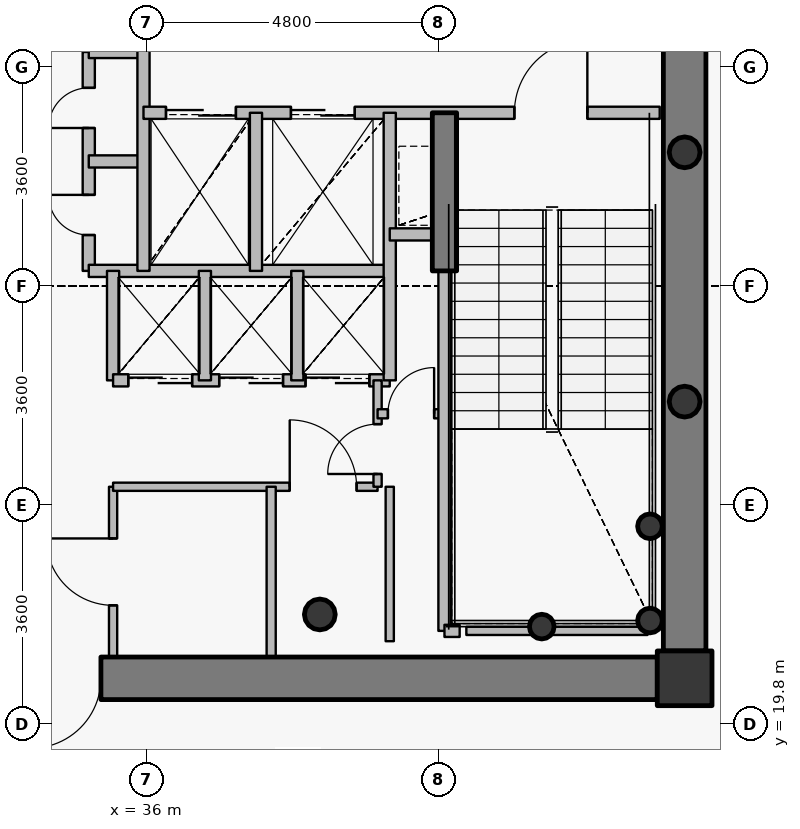
"""IFC4 building model, lengths in metres.
Left out: names, types, materials, properties, quantities, classifications, styles, units other than length and angle.
Written with IfcOpenShell. Run it as: python <this file> out.ifc"""

import sys

from ifc_helpers import new_model, si_unit, direction, frame, frame_2d, origin, origin_2d, place, context, subcontext, project, spatial, rectangle, hollow_circle, extrude, source, transform, mapped, element, fill, save


model = new_model("IFC4")
c1 = context("Model", 3, precision=1e-05, world=origin(), true_north=direction((0.0, 1.0)))
c2 = subcontext(c1, "Body", "Model", "MODEL_VIEW")
j1 = project(units=[si_unit("LENGTHUNIT", "METRE"), si_unit("PLANEANGLEUNIT", "RADIAN")], contexts=[c1])
p1 = place(None, origin())
s1 = spatial("IfcSite", under=j1, at=p1, CompositionType="ELEMENT")
p2 = place(p1, origin())
s2 = spatial("IfcBuilding", under=s1, at=p2, CompositionType="ELEMENT")
p3 = place(p2, frame((0.0, 0.0, 324.0)))
s3 = spatial("IfcBuildingStorey", under=s2, at=p3, CompositionType="ELEMENT", Elevation=324.0)
p4 = place(p3, frame((44.85, 20.55, 0.0), z_axis=(0.0, 0.0, 1.0), x_axis=(1.0, 0.0, 0.0)))
e1 = element("IfcColumn", 1, at=p4, inside=s3, PredefinedType="COLUMN", context=c2, shape_type="SweptSolid", body=[
    extrude(rectangle(XDim=0.9, YDim=0.9, at=origin_2d()), origin(), (0.0, 0.0, 1.0), 3.8),
])
p5 = place(p3, frame((38.85, 21.6, 0.0), z_axis=(0.0, 0.0, 1.0), x_axis=(1.0, 0.0, 0.0)))
e2 = element("IfcColumn", 2, at=p5, inside=s3, PredefinedType="COLUMN", context=c2, shape_type="SweptSolid", body=[
    extrude(hollow_circle(Radius=0.254, WallThickness=0.02, at=origin_2d()), origin(), (0.0, 0.0, 1.0), 3.8),
])
for number, where, z_axis, x_axis in (
    (3, (44.28, 21.5, 0.0), (0.0, 0.0, 1.0), (1.0, 0.0, 0.0)),
    (4, (44.28, 23.05, 0.0), (0.0, 0.0, 1.0), (1.0, 0.0, 0.0)),
    (5, (42.5, 21.4, 0.0), (0.0, 0.0, 1.0), (1.0, 0.0, 0.0)),
):
    element("IfcColumn", number, at=place(p3, frame(where, z_axis=z_axis, x_axis=x_axis)), inside=s3, PredefinedType="COLUMN", context=c2, shape_type="SweptSolid", body=[
        extrude(hollow_circle(Radius=0.203, WallThickness=0.016, at=origin_2d()), origin(), (0.0, 0.0, 1.0), 3.8),
    ])
p6 = place(p3, frame((44.85, 33.0, 0.0), z_axis=(0.0, 0.0, 1.0), x_axis=(0.0, -1.0, 0.0)))
e6 = element("IfcWall", 6, at=p6, inside=s3, PredefinedType="SHEAR", context=c2, shape_type="SweptSolid", body=[
    extrude(rectangle(XDim=12.0, YDim=0.7, at=frame_2d((6.0, 0.0))), origin(), (0.0, 0.0, 1.0), 3.1),
])
p7 = place(p3, frame((44.4, 20.55, 0.0), z_axis=(0.0, 0.0, 1.0), x_axis=(-1.0, 0.0, 0.0)))
e7 = element("IfcWall", 7, at=p7, inside=s3, PredefinedType="SHEAR", context=c2, shape_type="SweptSolid", body=[
    extrude(rectangle(XDim=16.8, YDim=0.7, at=frame_2d((8.4, 0.0))), origin(), (0.0, 0.0, 1.0), 3.1),
])
p8 = place(p7, frame((13.0, 0.0, 0.0)))
e8 = element("IfcOpeningElement", 8, at=p8, cuts=e7, PredefinedType="OPENING", context=c2, shape_type="SweptSolid", body=[
    extrude(rectangle(XDim=1.15, YDim=2.15, at=origin_2d()), frame((0.575, 0.36, 1.075), z_axis=(0.0, -1.0, 0.0), x_axis=(1.0, 0.0, 0.0)), (0.0, 0.0, 1.0), 0.72),
])
p9 = place(p7, frame((9.15, 0.0, 0.0)))
e9 = element("IfcOpeningElement", 9, at=p9, cuts=e7, PredefinedType="OPENING", context=c2, shape_type="SweptSolid", body=[
    extrude(rectangle(XDim=1.15, YDim=2.15, at=origin_2d()), frame((0.575, 0.36, 1.075), z_axis=(0.0, -1.0, 0.0), x_axis=(1.0, 0.0, 0.0)), (0.0, 0.0, 1.0), 0.72),
])
p10 = place(p3, frame((40.9, 27.25, 0.0), z_axis=(0.0, 0.0, 1.0), x_axis=(0.0, 1.0, 0.0)))
e10 = element("IfcWall", 10, at=p10, inside=s3, PredefinedType="SHEAR", context=c2, shape_type="SweptSolid", body=[
    extrude(rectangle(XDim=2.6, YDim=0.4, at=frame_2d((1.3, 0.0))), origin(), (0.0, 0.0, 1.0), 3.15),
])
for number, where, z_axis, x_axis in (
    (11, (44.85, 25.1, 0.0), (0.0, 0.0, 1.0), (1.0, 0.0, 0.0)),
    (12, (44.85, 29.2, 0.0), (0.0, 0.0, 1.0), (1.0, 0.0, 0.0)),
):
    element("IfcColumn", number, at=place(p3, frame(where, z_axis=z_axis, x_axis=x_axis)), inside=s3, PredefinedType="COLUMN", context=c2, shape_type="SweptSolid", body=[
        extrude(hollow_circle(Radius=0.254, WallThickness=0.02, at=origin_2d()), origin(), (0.0, 0.0, 1.0), 3.8),
    ])
p11 = place(p3, frame((35.05, 27.25, 0.0), z_axis=(0.0, 0.0, 1.0), x_axis=(0.0, 1.0, 0.0)))
e13 = element("IfcWall", 13, at=p11, inside=s3, PredefinedType="PARTITIONING", context=c2, shape_type="SweptSolid", body=[
    extrude(rectangle(XDim=3.6, YDim=0.2, at=frame_2d((1.8, 0.0))), origin(), (0.0, 0.0, 1.0), 3.55),
])
p12 = place(p11, frame((0.59, 0.0, 0.0)))
e14 = element("IfcOpeningElement", 14, at=p12, cuts=e13, PredefinedType="OPENING", context=c2, shape_type="SweptSolid", body=[
    extrude(rectangle(XDim=0.66, YDim=2.05, at=origin_2d()), frame((0.33, 0.11, 1.025), z_axis=(0.0, -1.0, 0.0), x_axis=(1.0, 0.0, 0.0)), (0.0, 0.0, 1.0), 0.22),
])
p13 = place(p11, frame((2.35, 0.0, 0.0)))
e15 = element("IfcOpeningElement", 15, at=p13, cuts=e13, PredefinedType="OPENING", context=c2, shape_type="SweptSolid", body=[
    extrude(rectangle(XDim=0.66, YDim=2.05, at=origin_2d()), frame((0.33, 0.11, 1.025), z_axis=(0.0, -1.0, 0.0), x_axis=(1.0, 0.0, 0.0)), (0.0, 0.0, 1.0), 0.22),
])
p14 = place(p3, frame((35.05, 27.25, 0.0), z_axis=(0.0, 0.0, 1.0), x_axis=(1.0, 0.0, 0.0)))
e16 = element("IfcWall", 16, at=p14, inside=s3, PredefinedType="PARTITIONING", context=c2, shape_type="SweptSolid", body=[
    extrude(rectangle(XDim=4.95, YDim=0.2, at=frame_2d((2.475, 0.0))), origin(), (0.0, 0.0, 1.0), 3.135),
])
for number, where, z_axis, x_axis in (
    (17, (35.05, 29.05, 0.0), (0.0, 0.0, 1.0), (1.0, 0.0, 0.0)),
    (18, (35.05, 30.85, 0.0), (0.0, 0.0, 1.0), (1.0, 0.0, 0.0)),
):
    element("IfcWall", number, at=place(p3, frame(where, z_axis=z_axis, x_axis=x_axis)), inside=s3, PredefinedType="PARTITIONING", context=c2, shape_type="SweptSolid", body=[
        extrude(rectangle(XDim=0.9, YDim=0.2, at=frame_2d((0.45, 0.0))), origin(), (0.0, 0.0, 1.0), 3.55),
    ])
p15 = place(p3, frame((35.45, 20.9, 0.0), z_axis=(0.0, 0.0, 1.0), x_axis=(0.0, 1.0, 0.0)))
e19 = element("IfcWall", 19, at=p15, inside=s3, PredefinedType="PARTITIONING", context=c2, shape_type="SweptSolid", body=[
    extrude(rectangle(XDim=2.8, YDim=0.135, at=frame_2d((1.4, 0.0))), origin(), (0.0, 0.0, 1.0), 3.135),
])
p16 = place(p15, frame((0.85, 0.0, 0.0)))
e20 = element("IfcOpeningElement", 20, at=p16, cuts=e19, PredefinedType="OPENING", context=c2, shape_type="SweptSolid", body=[
    extrude(rectangle(XDim=1.1, YDim=2.15, at=origin_2d()), frame((0.55, 0.078, 1.075), z_axis=(0.0, -1.0, 0.0), x_axis=(1.0, 0.0, 0.0)), (0.0, 0.0, 1.0), 0.155),
])
p17 = place(p3, frame((35.45, 23.7, 0.0), z_axis=(0.0, 0.0, 1.0), x_axis=(1.0, 0.0, 0.0)))
e21 = element("IfcWall", 21, at=p17, inside=s3, PredefinedType="PARTITIONING", context=c2, shape_type="SweptSolid", body=[
    extrude(rectangle(XDim=4.35, YDim=0.135, at=frame_2d((2.175, 0.0))), origin(), (0.0, 0.0, 1.0), 3.135),
])
p18 = place(p17, frame((2.905, 0.0, 0.0)))
e22 = element("IfcOpeningElement", 22, at=p18, cuts=e21, PredefinedType="OPENING", context=c2, shape_type="SweptSolid", body=[
    extrude(rectangle(XDim=1.1, YDim=2.15, at=origin_2d()), frame((0.55, 0.078, 1.075), z_axis=(0.0, -1.0, 0.0), x_axis=(1.0, 0.0, 0.0)), (0.0, 0.0, 1.0), 0.155),
])
p19 = place(p3, frame((35.45, 25.45, 0.0), z_axis=(0.0, 0.0, 1.0), x_axis=(0.0, 1.0, 0.0)))
e23 = element("IfcWall", 23, at=p19, inside=s3, PredefinedType="PARTITIONING", context=c2, shape_type="SweptSolid", body=[
    extrude(rectangle(XDim=1.8, YDim=0.2, at=frame_2d((0.9, 0.0))), origin(), (0.0, 0.0, 1.0), 3.55),
])
p20 = place(p3, frame((35.45, 25.45, 0.0), z_axis=(0.0, 0.0, 1.0), x_axis=(1.0, 0.0, 0.0)))
e24 = element("IfcWall", 24, at=p20, inside=s3, PredefinedType="PARTITIONING", context=c2, shape_type="SweptSolid", body=[
    extrude(rectangle(XDim=4.55, YDim=0.2, at=frame_2d((2.275, 0.0))), origin(), (0.0, 0.0, 1.0), 3.135),
])
p21 = place(p20, frame((0.25, 0.0, 0.0)))
e25 = element("IfcOpeningElement", 25, at=p21, cuts=e24, PredefinedType="OPENING", context=c2, shape_type="SweptSolid", body=[
    extrude(rectangle(XDim=1.05, YDim=2.15, at=origin_2d()), frame((0.525, 0.11, 1.075), z_axis=(0.0, -1.0, 0.0), x_axis=(1.0, 0.0, 0.0)), (0.0, 0.0, 1.0), 0.22),
])
p22 = place(p20, frame((1.745, 0.0, 0.0)))
e26 = element("IfcOpeningElement", 26, at=p22, cuts=e24, PredefinedType="OPENING", context=c2, shape_type="SweptSolid", body=[
    extrude(rectangle(XDim=1.05, YDim=2.15, at=origin_2d()), frame((0.525, 0.11, 1.075), z_axis=(0.0, -1.0, 0.0), x_axis=(1.0, 0.0, 0.0)), (0.0, 0.0, 1.0), 0.22),
])
p23 = place(p20, frame((3.165, 0.0, 0.0)))
e27 = element("IfcOpeningElement", 27, at=p23, cuts=e24, PredefinedType="OPENING", context=c2, shape_type="SweptSolid", body=[
    extrude(rectangle(XDim=1.05, YDim=2.15, at=origin_2d()), frame((0.525, 0.11, 1.075), z_axis=(0.0, -1.0, 0.0), x_axis=(1.0, 0.0, 0.0)), (0.0, 0.0, 1.0), 0.22),
])
p24 = place(p3, frame((35.95, 27.25, 0.0), z_axis=(0.0, 0.0, 1.0), x_axis=(0.0, 1.0, 0.0)))
e28 = element("IfcWall", 28, at=p24, inside=s3, PredefinedType="PARTITIONING", context=c2, shape_type="SweptSolid", body=[
    extrude(rectangle(XDim=3.8, YDim=0.2, at=frame_2d((1.9, 0.0))), origin(), (0.0, 0.0, 1.0), 3.55),
])
p25 = place(p3, frame((35.95, 29.85, 0.0), z_axis=(0.0, 0.0, 1.0), x_axis=(1.0, 0.0, 0.0)))
e29 = element("IfcWall", 29, at=p25, inside=s3, PredefinedType="PARTITIONING", context=c2, shape_type="SweptSolid", body=[
    extrude(rectangle(XDim=8.49, YDim=0.2, at=frame_2d((4.245, 0.0))), origin(), (0.0, 0.0, 1.0), 3.135),
])
p26 = place(p25, frame((6.1, 0.0, 0.0)))
e30 = element("IfcOpeningElement", 30, at=p26, cuts=e29, PredefinedType="OPENING", context=c2, shape_type="SweptSolid", body=[
    extrude(rectangle(XDim=1.2, YDim=2.15, at=origin_2d()), frame((0.6, 0.11, 1.075), z_axis=(0.0, -1.0, 0.0), x_axis=(1.0, 0.0, 0.0)), (0.0, 0.0, 1.0), 0.22),
])
p27 = place(p25, frame((0.37, 0.0, 0.0)))
e31 = element("IfcOpeningElement", 31, at=p27, cuts=e29, PredefinedType="OPENING", context=c2, shape_type="SweptSolid", body=[
    extrude(rectangle(XDim=1.15, YDim=2.15, at=origin_2d()), frame((0.575, 0.11, 1.075), z_axis=(0.0, -1.0, 0.0), x_axis=(1.0, 0.0, 0.0)), (0.0, 0.0, 1.0), 0.22),
])
p28 = place(p25, frame((2.425, 0.0, 0.0)))
e32 = element("IfcOpeningElement", 32, at=p28, cuts=e29, PredefinedType="OPENING", context=c2, shape_type="SweptSolid", body=[
    extrude(rectangle(XDim=1.05, YDim=2.15, at=origin_2d()), frame((0.525, 0.11, 1.075), z_axis=(0.0, -1.0, 0.0), x_axis=(1.0, 0.0, 0.0)), (0.0, 0.0, 1.0), 0.22),
])
p29 = place(p3, frame((36.96, 25.45, 0.0), z_axis=(0.0, 0.0, 1.0), x_axis=(0.0, 1.0, 0.0)))
e33 = element("IfcWall", 33, at=p29, inside=s3, PredefinedType="PARTITIONING", context=c2, shape_type="SweptSolid", body=[
    extrude(rectangle(XDim=1.8, YDim=0.2, at=frame_2d((0.9, 0.0))), origin(), (0.0, 0.0, 1.0), 3.55),
])
p30 = place(p3, frame((37.8, 27.25, 0.0), z_axis=(0.0, 0.0, 1.0), x_axis=(0.0, 1.0, 0.0)))
e34 = element("IfcWall", 34, at=p30, inside=s3, PredefinedType="PARTITIONING", context=c2, shape_type="SweptSolid", body=[
    extrude(rectangle(XDim=2.6, YDim=0.2, at=frame_2d((1.3, 0.0))), origin(), (0.0, 0.0, 1.0), 3.55),
])
p31 = place(p3, frame((38.05, 20.38, 0.0), z_axis=(0.0, 0.0, 1.0), x_axis=(0.0, 1.0, 0.0)))
e35 = element("IfcWall", 35, at=p31, inside=s3, PredefinedType="PARTITIONING", context=c2, shape_type="SweptSolid", body=[
    extrude(rectangle(XDim=3.32, YDim=0.15, at=frame_2d((1.66, 0.0))), origin(), (0.0, 0.0, 1.0), 3.085),
])
p32 = place(p3, frame((38.48, 25.45, 0.0), z_axis=(0.0, 0.0, 1.0), x_axis=(0.0, 1.0, 0.0)))
e36 = element("IfcWall", 36, at=p32, inside=s3, PredefinedType="PARTITIONING", context=c2, shape_type="SweptSolid", body=[
    extrude(rectangle(XDim=1.8, YDim=0.2, at=frame_2d((0.9, 0.0))), origin(), (0.0, 0.0, 1.0), 3.55),
])
p33 = place(p3, frame((39.8, 23.7, 0.0), z_axis=(0.0, 0.0, 1.0), x_axis=(0.0, 1.0, 0.0)))
e37 = element("IfcWall", 37, at=p33, inside=s3, PredefinedType="PARTITIONING", context=c2, shape_type="SweptSolid", body=[
    extrude(rectangle(XDim=1.75, YDim=0.135, at=frame_2d((0.875, 0.0))), origin(), (0.0, 0.0, 1.0), 3.55),
])
p34 = place(p33, frame((0.21, 0.0, 0.0)))
e38 = element("IfcOpeningElement", 38, at=p34, cuts=e37, PredefinedType="OPENING", context=c2, shape_type="SweptSolid", body=[
    extrude(rectangle(XDim=0.82, YDim=2.1, at=origin_2d()), frame((0.41, 0.078, 1.05), z_axis=(0.0, -1.0, 0.0), x_axis=(1.0, 0.0, 0.0)), (0.0, 0.0, 1.0), 0.155),
])
p35 = place(p3, frame((39.8, 24.9, 0.0), z_axis=(0.0, 0.0, 1.0), x_axis=(1.0, 0.0, 0.0)))
e39 = element("IfcWall", 39, at=p35, inside=s3, PredefinedType="PARTITIONING", context=c2, shape_type="SweptSolid", body=[
    extrude(rectangle(XDim=1.1, YDim=0.15, at=frame_2d((0.55, 0.0))), origin(), (0.0, 0.0, 1.0), 3.55),
])
p36 = place(p35, frame((0.17, 0.0, 0.0)))
e40 = element("IfcOpeningElement", 40, at=p36, cuts=e39, PredefinedType="OPENING", context=c2, shape_type="SweptSolid", body=[
    extrude(rectangle(XDim=0.76, YDim=2.1, at=origin_2d()), frame((0.38, 0.085, 1.05), z_axis=(0.0, -1.0, 0.0), x_axis=(1.0, 0.0, 0.0)), (0.0, 0.0, 1.0), 0.17),
])
p37 = place(p3, frame((40.0, 25.45, 0.0), z_axis=(0.0, 0.0, 1.0), x_axis=(0.0, 1.0, 0.0)))
e41 = element("IfcWall", 41, at=p37, inside=s3, PredefinedType="PARTITIONING", context=c2, shape_type="SweptSolid", body=[
    extrude(rectangle(XDim=4.4, YDim=0.2, at=frame_2d((2.2, 0.0))), origin(), (0.0, 0.0, 1.0), 3.55),
])
p38 = place(p3, frame((40.0, 27.85, 0.0), z_axis=(0.0, 0.0, 1.0), x_axis=(1.0, 0.0, 0.0)))
e42 = element("IfcWall", 42, at=p38, inside=s3, PredefinedType="PARTITIONING", context=c2, shape_type="SweptSolid", body=[
    extrude(rectangle(XDim=0.9, YDim=0.2, at=frame_2d((0.45, 0.0))), origin(), (0.0, 0.0, 1.0), 3.55),
])
p39 = place(p3, frame((40.9, 21.33, 0.0), z_axis=(0.0, 0.0, 1.0), x_axis=(0.0, 1.0, 0.0)))
e43 = element("IfcWall", 43, at=p39, inside=s3, PredefinedType="PARTITIONING", context=c2, shape_type="SweptSolid", body=[
    extrude(rectangle(XDim=5.91, YDim=0.2, at=frame_2d((2.955, 0.0))), origin(), (0.0, 0.0, 1.0), 3.085),
])
p40 = place(p3, frame((40.9, 21.33, 0.0), z_axis=(0.0, 0.0, 1.0), x_axis=(1.0, 0.0, 0.0)))
e44 = element("IfcWall", 44, at=p40, inside=s3, PredefinedType="PARTITIONING", context=c2, shape_type="SweptSolid", body=[
    extrude(rectangle(XDim=0.25, YDim=0.2, at=frame_2d((0.125, 0.0))), origin(), (0.0, 0.0, 1.0), 3.085),
])
p41 = place(p3, frame((44.24, 21.33, 0.0), z_axis=(0.0, 0.0, 1.0), x_axis=(-1.0, 0.0, 0.0)))
e45 = element("IfcWall", 45, at=p41, inside=s3, PredefinedType="PARTITIONING", context=c2, shape_type="SweptSolid", body=[
    extrude(rectangle(XDim=2.98, YDim=0.135, at=frame_2d((1.49, 0.0))), origin(), (0.0, 0.0, 1.0), 3.085),
])
p42 = place(p3, frame((40.0, 23.7, 0.0), z_axis=(0.0, 0.0, 1.0), x_axis=(0.0, -1.0, 0.0)))
e46 = element("IfcWall", 46, at=p42, inside=s3, PredefinedType="PARTITIONING", context=c2, shape_type="SweptSolid", body=[
    extrude(rectangle(XDim=2.54, YDim=0.135, at=frame_2d((1.27, 0.0))), origin(), (0.0, 0.0, 1.0), 3.085),
])
p43 = place(p3, frame((44.41, 20.2, 0.0), z_axis=(0.0, 0.0, 1.0), x_axis=(1.0, 0.0, 0.0)))
e47 = element("IfcWall", 47, at=p43, inside=s3, PredefinedType="PARTITIONING", context=c2, shape_type="SweptSolid", body=[
    extrude(rectangle(XDim=0.79, YDim=0.135, at=frame_2d((0.395, 0.0))), origin(), (0.0, 0.0, 1.0), 3.085),
])
p44 = place(p3, frame((45.2, 20.508, 0.0), z_axis=(0.0, 0.0, 1.0), x_axis=(0.0, 1.0, 0.0)))
e48 = element("IfcWall", 48, at=p44, inside=s3, PredefinedType="PARTITIONING", context=c2, shape_type="SweptSolid", body=[
    extrude(rectangle(XDim=0.482, YDim=0.135, at=frame_2d((0.241, 0.0))), origin(), (0.0, 0.0, 1.0), 3.55),
])
m1 = source(origin(), c2, "Body", "SweptSolid", [
    extrude(rectangle(XDim=1.15, YDim=2.15, at=origin_2d()), frame((0.575, 0.025, 1.075), z_axis=(0.0, -1.0, 0.0), x_axis=(1.0, 0.0, 0.0)), (0.0, 0.0, 1.0), 0.05),
])
p45 = place(p9, origin())
e49 = element("IfcDoor", 49, at=p45, inside=s3, OperationType="SINGLE_SWING_RIGHT", PredefinedType="DOOR", context=c2, shape_type="MappedRepresentation", body=[
    mapped(m1, transform((0.0, 0.0, 0.0), x_axis=(1.0, 0.0, 0.0), y_axis=(0.0, 1.0, 0.0), z_axis=(0.0, 0.0, 1.0), scale=1.0)),
])
fill(e9, e49)
m2 = source(origin(), c2, "Body", "SweptSolid", [
    extrude(rectangle(XDim=1.2, YDim=2.15, at=origin_2d()), frame((0.6, 0.025, 1.075), z_axis=(0.0, -1.0, 0.0), x_axis=(1.0, 0.0, 0.0)), (0.0, 0.0, 1.0), 0.05),
])
p46 = place(p26, origin())
e50 = element("IfcDoor", 50, at=p46, inside=s3, OperationType="SINGLE_SWING_RIGHT", PredefinedType="DOOR", context=c2, shape_type="MappedRepresentation", body=[
    mapped(m2, transform((0.0, 0.0, 0.0), x_axis=(1.0, 0.0, 0.0), y_axis=(0.0, 1.0, 0.0), z_axis=(0.0, 0.0, 1.0), scale=1.0)),
])
fill(e30, e50)
m3 = source(origin(), c2, "Body", "SweptSolid", [
    extrude(rectangle(XDim=1.15, YDim=2.15, at=origin_2d()), frame((0.575, 0.025, 1.075), z_axis=(0.0, -1.0, 0.0), x_axis=(1.0, 0.0, 0.0)), (0.0, 0.0, 1.0), 0.05),
])
p47 = place(p27, origin())
e51 = element("IfcDoor", 51, at=p47, inside=s3, OperationType="DOUBLE_DOOR_SLIDING", PredefinedType="USERDEFINED", context=c2, shape_type="MappedRepresentation", body=[
    mapped(m3, transform((0.0, 0.0, 0.0), x_axis=(1.0, 0.0, 0.0), y_axis=(0.0, 1.0, 0.0), z_axis=(0.0, 0.0, 1.0), scale=1.0)),
])
fill(e31, e51)
m4 = source(origin(), c2, "Body", "SweptSolid", [
    extrude(rectangle(XDim=1.05, YDim=2.15, at=origin_2d()), frame((0.525, 0.025, 1.075), z_axis=(0.0, -1.0, 0.0), x_axis=(1.0, 0.0, 0.0)), (0.0, 0.0, 1.0), 0.05),
])
p48 = place(p28, origin())
e52 = element("IfcDoor", 52, at=p48, inside=s3, OperationType="DOUBLE_DOOR_SLIDING", PredefinedType="USERDEFINED", context=c2, shape_type="MappedRepresentation", body=[
    mapped(m4, transform((0.0, 0.0, 0.0), x_axis=(1.0, 0.0, 0.0), y_axis=(0.0, 1.0, 0.0), z_axis=(0.0, 0.0, 1.0), scale=1.0)),
])
fill(e32, e52)
p49 = place(p21, origin())
e53 = element("IfcDoor", 53, at=p49, inside=s3, OperationType="DOUBLE_DOOR_SLIDING", PredefinedType="USERDEFINED", context=c2, shape_type="MappedRepresentation", body=[
    mapped(m4, transform((0.0, 0.0, 0.0), x_axis=(1.0, 0.0, 0.0), y_axis=(0.0, 1.0, 0.0), z_axis=(0.0, 0.0, 1.0), scale=1.0)),
])
fill(e25, e53)
p50 = place(p22, origin())
e54 = element("IfcDoor", 54, at=p50, inside=s3, OperationType="DOUBLE_DOOR_SLIDING", PredefinedType="USERDEFINED", context=c2, shape_type="MappedRepresentation", body=[
    mapped(m4, transform((0.0, 0.0, 0.0), x_axis=(1.0, 0.0, 0.0), y_axis=(0.0, 1.0, 0.0), z_axis=(0.0, 0.0, 1.0), scale=1.0)),
])
fill(e26, e54)
p51 = place(p23, origin())
e55 = element("IfcDoor", 55, at=p51, inside=s3, OperationType="DOUBLE_DOOR_SLIDING", PredefinedType="USERDEFINED", context=c2, shape_type="MappedRepresentation", body=[
    mapped(m4, transform((0.0, 0.0, 0.0), x_axis=(1.0, 0.0, 0.0), y_axis=(0.0, 1.0, 0.0), z_axis=(0.0, 0.0, 1.0), scale=1.0)),
])
fill(e27, e55)
m5 = source(origin(), c2, "Body", "SweptSolid", [
    extrude(rectangle(XDim=0.66, YDim=2.05, at=origin_2d()), frame((0.33, 0.025, 1.025), z_axis=(0.0, -1.0, 0.0), x_axis=(1.0, 0.0, 0.0)), (0.0, 0.0, 1.0), 0.05),
])
p52 = place(p12, origin())
e56 = element("IfcDoor", 56, at=p52, inside=s3, OperationType="SINGLE_SWING_RIGHT", PredefinedType="USERDEFINED", context=c2, shape_type="MappedRepresentation", body=[
    mapped(m5, transform((0.0, 0.0, 0.0), x_axis=(1.0, 0.0, 0.0), y_axis=(0.0, 1.0, 0.0), z_axis=(0.0, 0.0, 1.0), scale=1.0)),
])
fill(e14, e56)
p53 = place(p13, origin())
e57 = element("IfcDoor", 57, at=p53, inside=s3, OperationType="SINGLE_SWING_LEFT", PredefinedType="USERDEFINED", context=c2, shape_type="MappedRepresentation", body=[
    mapped(m5, transform((0.0, 0.0, 0.0), x_axis=(1.0, 0.0, 0.0), y_axis=(0.0, 1.0, 0.0), z_axis=(0.0, 0.0, 1.0), scale=1.0)),
])
fill(e15, e57)
m6 = source(origin(), c2, "Body", "SweptSolid", [
    extrude(rectangle(XDim=1.1, YDim=2.15, at=origin_2d()), frame((0.55, 0.025, 1.075), z_axis=(0.0, -1.0, 0.0), x_axis=(1.0, 0.0, 0.0)), (0.0, 0.0, 1.0), 0.05),
])
p54 = place(p16, origin())
e58 = element("IfcDoor", 58, at=p54, inside=s3, OperationType="SINGLE_SWING_RIGHT", PredefinedType="DOOR", context=c2, shape_type="MappedRepresentation", body=[
    mapped(m6, transform((0.0, 0.0, 0.0), x_axis=(1.0, 0.0, 0.0), y_axis=(0.0, 1.0, 0.0), z_axis=(0.0, 0.0, 1.0), scale=1.0)),
])
fill(e20, e58)
p55 = place(p18, origin())
e59 = element("IfcDoor", 59, at=p55, inside=s3, OperationType="SINGLE_SWING_LEFT", PredefinedType="DOOR", context=c2, shape_type="MappedRepresentation", body=[
    mapped(m6, transform((0.0, 0.0, 0.0), x_axis=(1.0, 0.0, 0.0), y_axis=(0.0, 1.0, 0.0), z_axis=(0.0, 0.0, 1.0), scale=1.0)),
])
fill(e22, e59)
m7 = source(origin(), c2, "Body", "SweptSolid", [
    extrude(rectangle(XDim=0.82, YDim=2.1, at=origin_2d()), frame((0.41, 0.025, 1.05), z_axis=(0.0, -1.0, 0.0), x_axis=(1.0, 0.0, 0.0)), (0.0, 0.0, 1.0), 0.05),
])
p56 = place(p34, origin())
e60 = element("IfcDoor", 60, at=p56, inside=s3, OperationType="SINGLE_SWING_LEFT", PredefinedType="DOOR", context=c2, shape_type="MappedRepresentation", body=[
    mapped(m7, transform((0.0, 0.0, 0.0), x_axis=(1.0, 0.0, 0.0), y_axis=(0.0, 1.0, 0.0), z_axis=(0.0, 0.0, 1.0), scale=1.0)),
])
fill(e38, e60)
m8 = source(origin(), c2, "Body", "SweptSolid", [
    extrude(rectangle(XDim=0.76, YDim=2.1, at=origin_2d()), frame((0.38, 0.025, 1.05), z_axis=(0.0, -1.0, 0.0), x_axis=(1.0, 0.0, 0.0)), (0.0, 0.0, 1.0), 0.05),
])
p57 = place(p36, origin())
e61 = element("IfcDoor", 61, at=p57, inside=s3, OperationType="SINGLE_SWING_RIGHT", PredefinedType="DOOR", context=c2, shape_type="MappedRepresentation", body=[
    mapped(m8, transform((0.0, 0.0, 0.0), x_axis=(1.0, 0.0, 0.0), y_axis=(0.0, 1.0, 0.0), z_axis=(0.0, 0.0, 1.0), scale=1.0)),
])
fill(e40, e61)
save(model, sys.argv[1])
